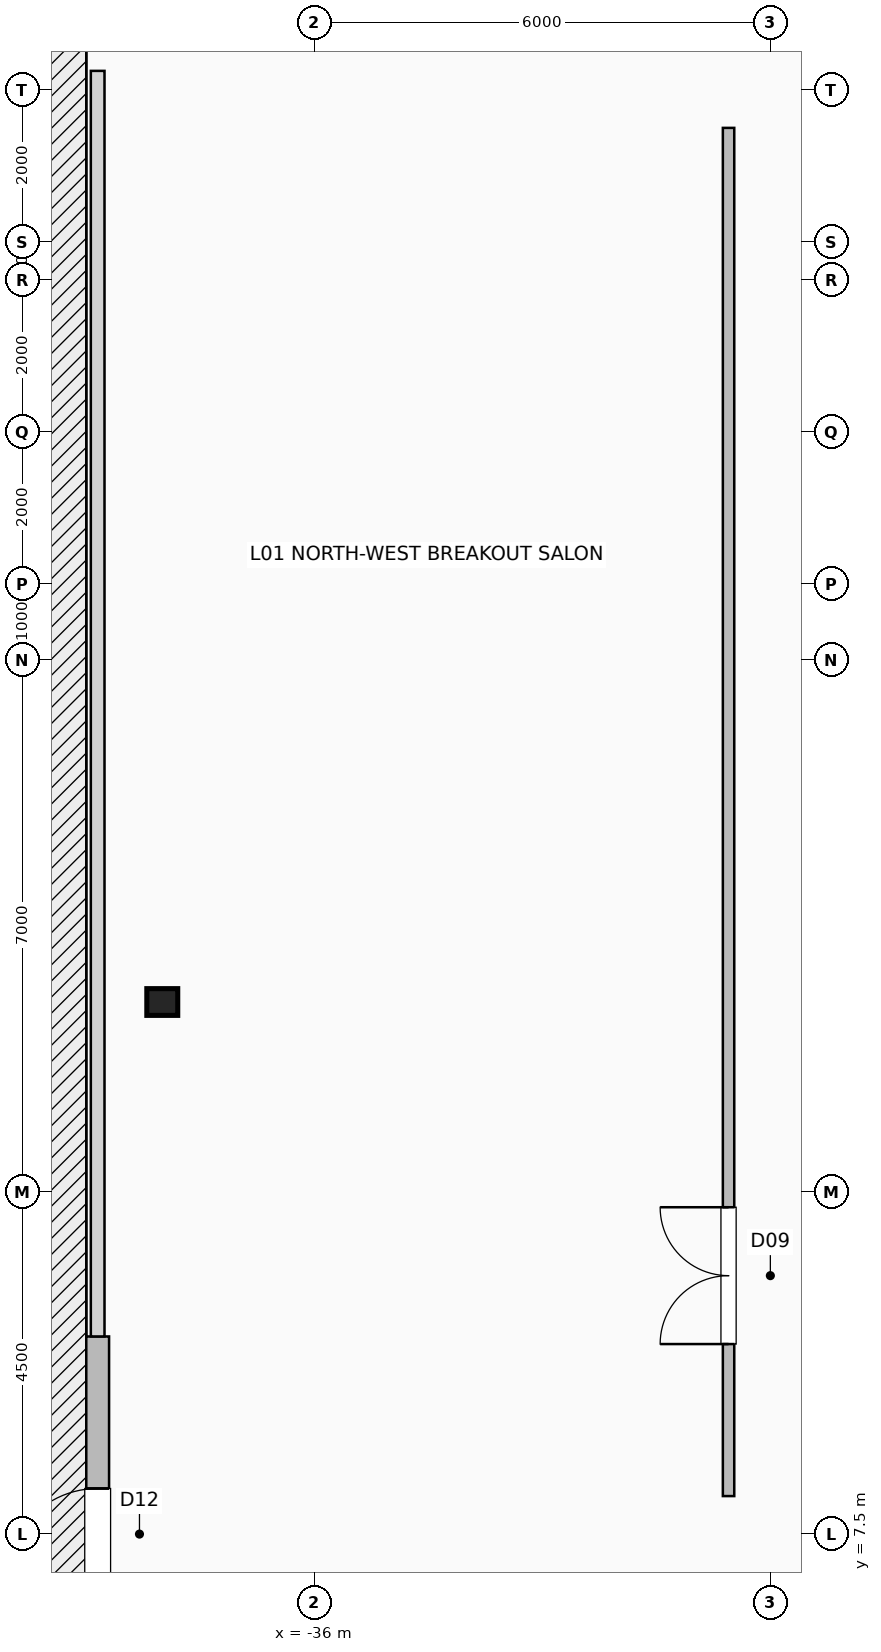
"""IFC4 building model, lengths in metres.
Left out: names, types, materials, properties, quantities, classifications, styles, units other than length and angle.
Written with IfcOpenShell. Run it as: python <this file> out.ifc"""

import sys

from ifc_helpers import new_model, si_unit, direction, frame, frame_2d, origin, origin_2d, place, context, subcontext, project, spatial, rectangle, i_section, extrude, element, fill, save


model = new_model("IFC4")
c1 = context("Model", 3, precision=1e-05, world=origin(), true_north=direction((0.0, 1.0)))
c2 = subcontext(c1, "Body", "Model", "MODEL_VIEW")
j1 = project(units=[si_unit("LENGTHUNIT", "METRE"), si_unit("PLANEANGLEUNIT", "RADIAN")], contexts=[c1])
p1 = place(None, origin())
s1 = spatial("IfcSite", under=j1, at=p1, CompositionType="ELEMENT")
p2 = place(p1, origin())
s2 = spatial("IfcBuilding", under=s1, at=p2, CompositionType="ELEMENT")
p3 = place(p2, frame((0.0, 0.0, 5.4)))
s3 = spatial("IfcBuildingStorey", under=s2, at=p3, CompositionType="ELEMENT", Elevation=5.4)
p4 = place(p3, frame((-38.0, 14.5, -0.4), z_axis=(0.0, 0.0, 1.0), x_axis=(1.0, 0.0, 0.0)))
e1 = element("IfcColumn", 1, at=p4, inside=s3, PredefinedType="COLUMN", context=c2, shape_type="SweptSolid", body=[
    extrude(i_section(OverallWidth=0.352, OverallDepth=0.407, WebThickness=0.025, FlangeThickness=0.04, FilletRadius=0.02, at=origin_2d()), origin(), (0.0, 0.0, 1.0), 5.4),
])
p5 = place(p3, frame((-38.85, 4.9, 0.0), z_axis=(0.0, 0.0, 1.0), x_axis=(0.0, 1.0, 0.0)))
e2 = element("IfcWall", 2, at=p5, inside=s3, PredefinedType="SOLIDWALL", context=c2, shape_type="SweptSolid", body=[
    extrude(rectangle(XDim=5.2, YDim=0.3, at=frame_2d((2.6, 0.0))), origin(), (0.0, 0.0, 1.0), 5.0),
])
p6 = place(p5, frame((2.0, 0.0, 0.0)))
e3 = element("IfcOpeningElement", 3, at=p6, cuts=e2, PredefinedType="OPENING", context=c2, shape_type="SweptSolid", body=[
    extrude(rectangle(XDim=1.2, YDim=2.25, at=frame_2d((0.6, 1.125))), frame((0.0, 0.16, 0.0), z_axis=(0.0, -1.0, 0.0), x_axis=(1.0, 0.0, 0.0)), (0.0, 0.0, 1.0), 0.32),
])
p7 = place(p3, frame((-30.55, 8.0, 0.0), z_axis=(0.0, 0.0, 1.0), x_axis=(0.0, 1.0, 0.0)))
e4 = element("IfcWall", 4, at=p7, inside=s3, PredefinedType="PARTITIONING", context=c2, shape_type="SweptSolid", body=[
    extrude(rectangle(XDim=18.0, YDim=0.15, at=frame_2d((9.0, 0.0))), origin(), (0.0, 0.0, 1.0), 5.0),
])
p8 = place(p7, frame((2.0, 0.0, 0.0)))
e5 = element("IfcOpeningElement", 5, at=p8, cuts=e4, PredefinedType="OPENING", context=c2, shape_type="SweptSolid", body=[
    extrude(rectangle(XDim=1.8, YDim=2.08, at=frame_2d((0.9, 1.04))), frame((0.0, 0.085, 0.0), z_axis=(0.0, -1.0, 0.0), x_axis=(1.0, 0.0, 0.0)), (0.0, 0.0, 1.0), 0.17),
])
p9 = place(p6, origin())
e6 = element("IfcDoor", 6, at=p9, inside=s3, OperationType="SINGLE_SWING_LEFT", PredefinedType="DOOR", context=c2, shape_type="SweptSolid", body=[
    extrude(rectangle(XDim=1.2, YDim=2.25, at=frame_2d((0.6, 1.125))), frame((0.0, 0.025, 0.0), z_axis=(0.0, -1.0, 0.0), x_axis=(1.0, 0.0, 0.0)), (0.0, 0.0, 1.0), 0.05),
])
fill(e3, e6)
p10 = place(p8, origin())
e7 = element("IfcDoor", 7, at=p10, inside=s3, OperationType="DOUBLE_DOOR_SINGLE_SWING", PredefinedType="DOOR", context=c2, shape_type="SweptSolid", body=[
    extrude(rectangle(XDim=1.8, YDim=2.08, at=frame_2d((0.9, 1.04))), frame((0.0, 0.025, 0.0), z_axis=(0.0, -1.0, 0.0), x_axis=(1.0, 0.0, 0.0)), (0.0, 0.0, 1.0), 0.05),
])
fill(e5, e7)
save(model, sys.argv[1])
